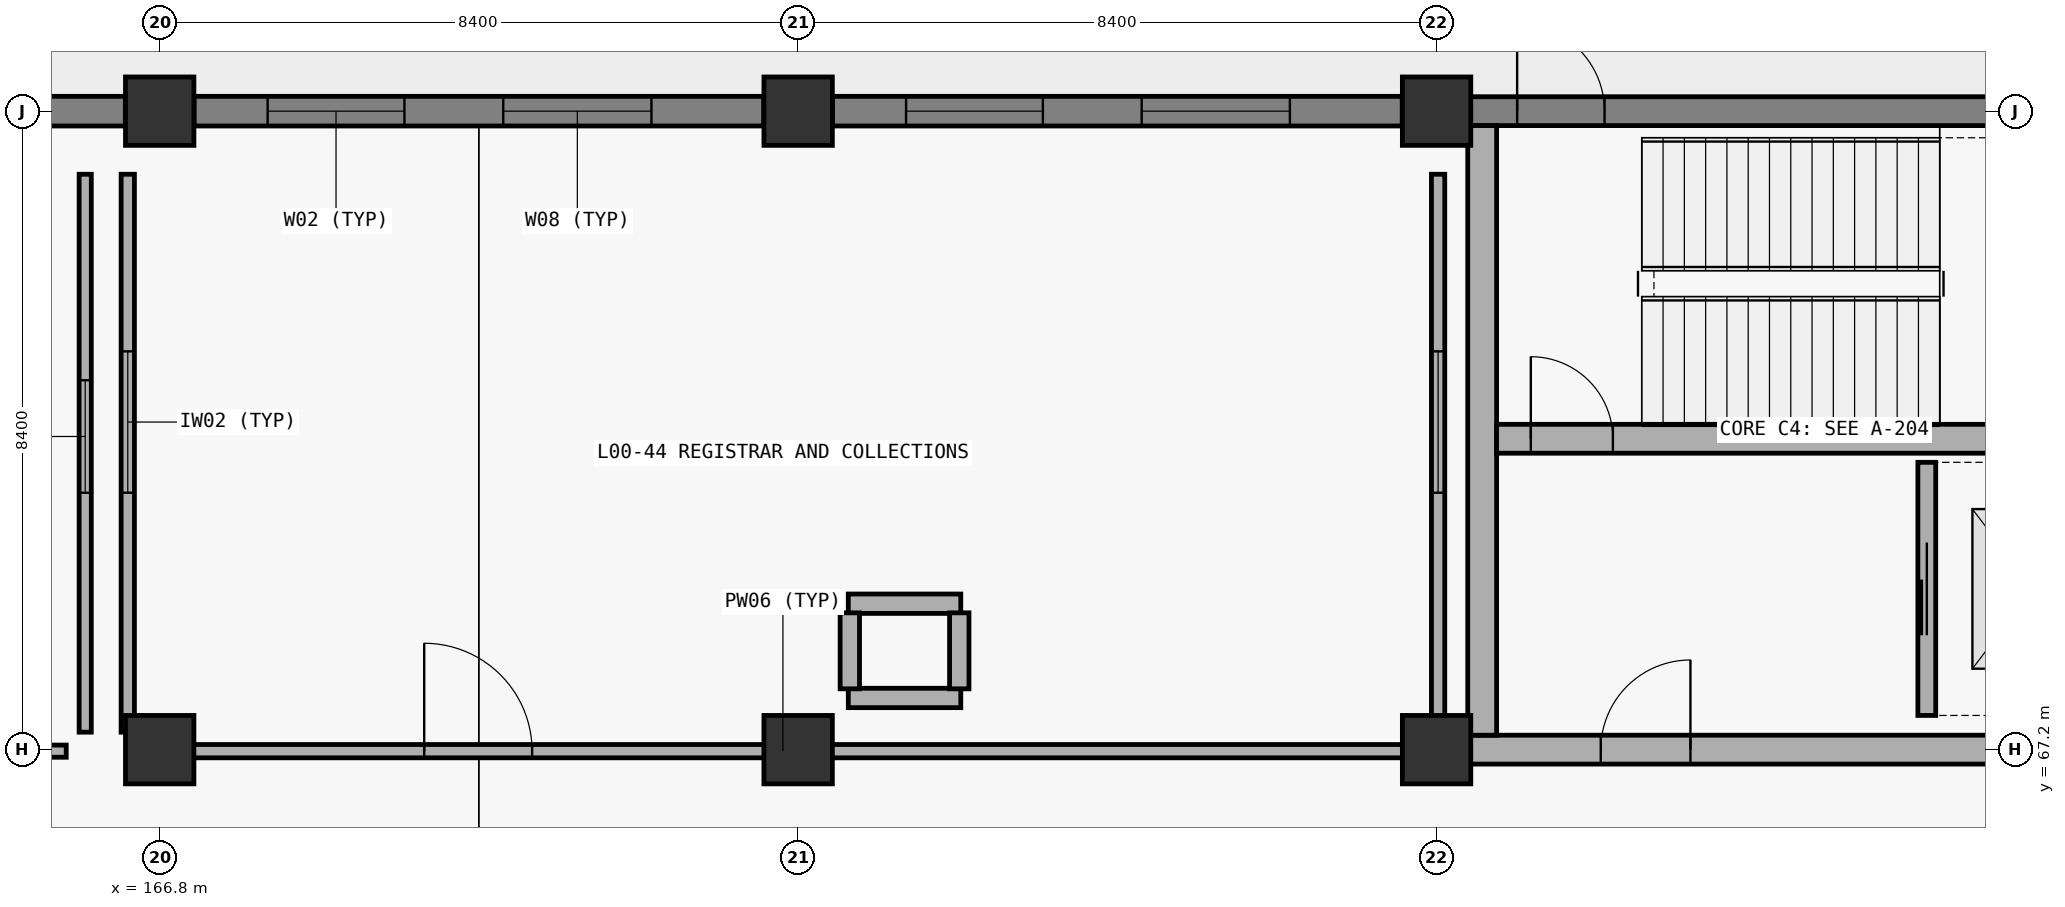
"""IFC4 building model, lengths in metres.
Left out: names, types, materials, properties, quantities, classifications, styles, units other than length and angle.
Written with IfcOpenShell. Run it as: python <this file> out.ifc"""

import sys

from ifc_helpers import new_model, si_unit, direction, frame, frame_2d, origin, origin_2d, place, context, subcontext, project, spatial, rectangle, extrude, element, fill, save


model = new_model("IFC4")
c1 = context("Model", 3, precision=1e-05, world=origin(), true_north=direction((0.0, 1.0)))
c2 = subcontext(c1, "Body", "Model", "MODEL_VIEW")
j1 = project(units=[si_unit("LENGTHUNIT", "METRE"), si_unit("PLANEANGLEUNIT", "RADIAN")], contexts=[c1])
p1 = place(None, origin())
s1 = spatial("IfcSite", under=j1, at=p1, CompositionType="ELEMENT")
p2 = place(p1, origin())
s2 = spatial("IfcBuilding", under=s1, at=p2, CompositionType="ELEMENT")
p3 = place(p2, origin())
s3 = spatial("IfcBuildingStorey", under=s2, at=p3, CompositionType="ELEMENT", Elevation=0.0)
for number, where, z_axis, x_axis in (
    (1, (166.8, 67.2, 0.0), (0.0, 0.0, 1.0), (1.0, 0.0, 0.0)),
    (2, (166.8, 75.6, 0.0), (0.0, 0.0, 1.0), (1.0, 0.0, 0.0)),
    (3, (175.2, 67.2, 0.0), (0.0, 0.0, 1.0), (1.0, 0.0, 0.0)),
    (4, (175.2, 75.6, 0.0), (0.0, 0.0, 1.0), (1.0, 0.0, 0.0)),
    (5, (183.6, 67.2, 0.0), (0.0, 0.0, 1.0), (1.0, 0.0, 0.0)),
    (6, (183.6, 75.6, 0.0), (0.0, 0.0, 1.0), (1.0, 0.0, 0.0)),
):
    element("IfcColumn", number, at=place(p3, frame(where, z_axis=z_axis, x_axis=x_axis)), inside=s3, PredefinedType="COLUMN", context=c2, shape_type="SweptSolid", body=[
        extrude(rectangle(XDim=0.9, YDim=0.9, at=origin_2d()), origin(), (0.0, 0.0, 1.0), 5.4),
    ])
p4 = place(p3, frame((184.01, 67.2, 0.0), z_axis=(0.0, 0.0, 1.0), x_axis=(1.0, 0.0, 0.0)))
e7 = element("IfcWall", 7, at=p4, inside=s3, PredefinedType="SHEAR", context=c2, shape_type="SweptSolid", body=[
    extrude(rectangle(XDim=9.38, YDim=0.38, at=frame_2d((4.69, 0.0))), origin(), (0.0, 0.0, 1.0), 5.4),
])
p5 = place(p4, frame((1.75, 0.0, 0.0)))
e8 = element("IfcOpeningElement", 8, at=p5, cuts=e7, PredefinedType="OPENING", context=c2, shape_type="SweptSolid", body=[
    extrude(rectangle(XDim=1.18, YDim=2.24, at=frame_2d((0.59, 1.12))), frame((0.0, 0.2, 0.0), z_axis=(0.0, -1.0, 0.0), x_axis=(1.0, 0.0, 0.0)), (0.0, 0.0, 1.0), 0.4),
])
p6 = place(p3, frame((184.01, 75.6, 0.0), z_axis=(0.0, 0.0, 1.0), x_axis=(1.0, 0.0, 0.0)))
e9 = element("IfcWall", 9, at=p6, inside=s3, PredefinedType="SHEAR", context=c2, shape_type="SweptSolid", body=[
    extrude(rectangle(XDim=9.38, YDim=0.38, at=frame_2d((4.69, 0.0))), origin(), (0.0, 0.0, 1.0), 5.4),
])
p7 = place(p6, frame((0.65, 0.0, 0.0)))
e10 = element("IfcOpeningElement", 10, at=p7, cuts=e9, PredefinedType="OPENING", context=c2, shape_type="SweptSolid", body=[
    extrude(rectangle(XDim=1.15, YDim=2.2, at=frame_2d((0.575, 1.1))), frame((0.0, 0.2, 0.0), z_axis=(0.0, -1.0, 0.0), x_axis=(1.0, 0.0, 0.0)), (0.0, 0.0, 1.0), 0.4),
])
p8 = place(p3, frame((184.2, 67.39, 0.0), z_axis=(0.0, 0.0, 1.0), x_axis=(0.0, 1.0, 0.0)))
e11 = element("IfcWall", 11, at=p8, inside=s3, PredefinedType="SHEAR", context=c2, shape_type="SweptSolid", body=[
    extrude(rectangle(XDim=8.02, YDim=0.38, at=frame_2d((4.01, 0.0))), origin(), (0.0, 0.0, 1.0), 5.4),
])
p9 = place(p3, frame((184.39, 71.29, 0.0), z_axis=(0.0, 0.0, 1.0), x_axis=(1.0, 0.0, 0.0)))
e12 = element("IfcWall", 12, at=p9, inside=s3, PredefinedType="SHEAR", context=c2, shape_type="SweptSolid", body=[
    extrude(rectangle(XDim=8.62, YDim=0.38, at=frame_2d((4.31, 0.0))), origin(), (0.0, 0.0, 1.0), 5.4),
])
p10 = place(p9, frame((0.45, 0.0, 0.0)))
e13 = element("IfcOpeningElement", 13, at=p10, cuts=e12, PredefinedType="OPENING", context=c2, shape_type="SweptSolid", body=[
    extrude(rectangle(XDim=1.08, YDim=2.18, at=frame_2d((0.54, 1.09))), frame((0.0, 0.2, 0.0), z_axis=(0.0, -1.0, 0.0), x_axis=(1.0, 0.0, 0.0)), (0.0, 0.0, 1.0), 0.4),
])
p11 = place(p3, frame((158.852, 75.6, 0.0), z_axis=(0.0, 0.0, 1.0), x_axis=(1.0, 0.0, 0.0)))
e14 = element("IfcWall", 14, at=p11, inside=s3, PredefinedType="SOLIDWALL", context=c2, shape_type="SweptSolid", body=[
    extrude(rectangle(XDim=7.496, YDim=0.39, at=frame_2d((3.748, 0.0))), origin(), (0.0, 0.0, 1.0), 4.44),
])
p12 = place(p11, frame((0.968, 0.0, 0.85)))
e15 = element("IfcOpeningElement", 15, at=p12, cuts=e14, PredefinedType="OPENING", context=c2, shape_type="SweptSolid", body=[
    extrude(rectangle(XDim=1.8, YDim=2.5, at=frame_2d((0.9, 1.25))), frame((0.0, 0.205, 0.0), z_axis=(0.0, -1.0, 0.0), x_axis=(1.0, 0.0, 0.0)), (0.0, 0.0, 1.0), 0.41),
])
p13 = place(p11, frame((4.068, 0.0, 0.85)))
e16 = element("IfcOpeningElement", 16, at=p13, cuts=e14, PredefinedType="OPENING", context=c2, shape_type="SweptSolid", body=[
    extrude(rectangle(XDim=1.95, YDim=2.3, at=frame_2d((0.975, 1.15))), frame((0.0, 0.205, 0.0), z_axis=(0.0, -1.0, 0.0), x_axis=(1.0, 0.0, 0.0)), (0.0, 0.0, 1.0), 0.41),
])
p14 = place(p3, frame((167.252, 75.6, 0.0), z_axis=(0.0, 0.0, 1.0), x_axis=(1.0, 0.0, 0.0)))
e17 = element("IfcWall", 17, at=p14, inside=s3, PredefinedType="SOLIDWALL", context=c2, shape_type="SweptSolid", body=[
    extrude(rectangle(XDim=7.496, YDim=0.39, at=frame_2d((3.748, 0.0))), origin(), (0.0, 0.0, 1.0), 4.69),
])
p15 = place(p14, frame((0.968, 0.0, 0.85)))
e18 = element("IfcOpeningElement", 18, at=p15, cuts=e17, PredefinedType="OPENING", context=c2, shape_type="SweptSolid", body=[
    extrude(rectangle(XDim=1.8, YDim=2.5, at=frame_2d((0.9, 1.25))), frame((0.0, 0.205, 0.0), z_axis=(0.0, -1.0, 0.0), x_axis=(1.0, 0.0, 0.0)), (0.0, 0.0, 1.0), 0.41),
])
p16 = place(p14, frame((4.068, 0.0, 0.85)))
e19 = element("IfcOpeningElement", 19, at=p16, cuts=e17, PredefinedType="OPENING", context=c2, shape_type="SweptSolid", body=[
    extrude(rectangle(XDim=1.95, YDim=2.3, at=frame_2d((0.975, 1.15))), frame((0.0, 0.205, 0.0), z_axis=(0.0, -1.0, 0.0), x_axis=(1.0, 0.0, 0.0)), (0.0, 0.0, 1.0), 0.41),
])
p17 = place(p3, frame((175.652, 75.6, 0.0), z_axis=(0.0, 0.0, 1.0), x_axis=(1.0, 0.0, 0.0)))
e20 = element("IfcWall", 20, at=p17, inside=s3, PredefinedType="SOLIDWALL", context=c2, shape_type="SweptSolid", body=[
    extrude(rectangle(XDim=7.496, YDim=0.39, at=frame_2d((3.748, 0.0))), origin(), (0.0, 0.0, 1.0), 4.44),
])
p18 = place(p17, frame((0.968, 0.0, 0.85)))
e21 = element("IfcOpeningElement", 21, at=p18, cuts=e20, PredefinedType="OPENING", context=c2, shape_type="SweptSolid", body=[
    extrude(rectangle(XDim=1.8, YDim=2.5, at=frame_2d((0.9, 1.25))), frame((0.0, 0.205, 0.0), z_axis=(0.0, -1.0, 0.0), x_axis=(1.0, 0.0, 0.0)), (0.0, 0.0, 1.0), 0.41),
])
p19 = place(p17, frame((4.068, 0.0, 0.85)))
e22 = element("IfcOpeningElement", 22, at=p19, cuts=e20, PredefinedType="OPENING", context=c2, shape_type="SweptSolid", body=[
    extrude(rectangle(XDim=1.95, YDim=2.3, at=frame_2d((0.975, 1.15))), frame((0.0, 0.205, 0.0), z_axis=(0.0, -1.0, 0.0), x_axis=(1.0, 0.0, 0.0)), (0.0, 0.0, 1.0), 0.41),
])
p20 = place(p3, frame((190.05, 67.65, 0.0), z_axis=(0.0, 0.0, 1.0), x_axis=(0.0, 1.0, 0.0)))
e23 = element("IfcWall", 23, at=p20, inside=s3, PredefinedType="PARTITIONING", context=c2, shape_type="SweptSolid", body=[
    extrude(rectangle(XDim=3.33, YDim=0.235, at=frame_2d((1.665, 0.0))), origin(), (0.0, 0.0, 1.0), 5.04),
])
p21 = place(p20, frame((1.055, 0.0, 0.0)))
e24 = element("IfcOpeningElement", 24, at=p21, cuts=e23, PredefinedType="OPENING", context=c2, shape_type="SweptSolid", body=[
    extrude(rectangle(XDim=1.22, YDim=2.24, at=frame_2d((0.61, 1.12))), frame((0.0, 0.127, 0.0), z_axis=(0.0, -1.0, 0.0), x_axis=(1.0, 0.0, 0.0)), (0.0, 0.0, 1.0), 0.255),
])
for number, where, z_axis, x_axis in (
    (25, (175.86, 69.12, 0.0), (0.0, 0.0, 1.0), (1.0, 0.0, 0.0)),
    (26, (175.86, 67.88, 0.0), (0.0, 0.0, 1.0), (1.0, 0.0, 0.0)),
):
    element("IfcWall", number, at=place(p3, frame(where, z_axis=z_axis, x_axis=x_axis)), inside=s3, PredefinedType="PARTITIONING", context=c2, shape_type="SweptSolid", body=[
        extrude(rectangle(XDim=1.48, YDim=0.255, at=frame_2d((0.74, 0.0))), origin(), (0.0, 0.0, 1.0), 5.04),
    ])
for number, where, z_axis, x_axis in (
    (27, (175.88, 68.0, 0.0), (0.0, 0.0, 1.0), (0.0, 1.0, 0.0)),
    (28, (177.32, 68.0, 0.0), (0.0, 0.0, 1.0), (0.0, 1.0, 0.0)),
):
    element("IfcWall", number, at=place(p3, frame(where, z_axis=z_axis, x_axis=x_axis)), inside=s3, PredefinedType="PARTITIONING", context=c2, shape_type="SweptSolid", body=[
        extrude(rectangle(XDim=1.0, YDim=0.255, at=frame_2d((0.5, 0.0))), origin(), (0.0, 0.0, 1.0), 5.04),
    ])
p22 = place(p3, frame((142.43, 67.18, 0.0), z_axis=(0.0, 0.0, 1.0), x_axis=(1.0, 0.0, 0.0)))
e29 = element("IfcWall", 29, at=p22, inside=s3, PredefinedType="PARTITIONING", context=c2, shape_type="SweptSolid", body=[
    extrude(rectangle(XDim=23.14, YDim=0.16, at=frame_2d((11.57, 0.0))), origin(), (0.0, 0.0, 1.0), 4.09),
])
p23 = place(p22, frame((2.65, 0.0, 0.0)))
e30 = element("IfcOpeningElement", 30, at=p23, cuts=e29, PredefinedType="OPENING", context=c2, shape_type="SweptSolid", body=[
    extrude(rectangle(XDim=1.36, YDim=2.36, at=frame_2d((0.68, 1.18))), frame((0.0, 0.09, 0.0), z_axis=(0.0, -1.0, 0.0), x_axis=(1.0, 0.0, 0.0)), (0.0, 0.0, 1.0), 0.18),
])
p24 = place(p3, frame((165.82, 67.43, 0.0), z_axis=(0.0, 0.0, 1.0), x_axis=(0.0, 1.0, 0.0)))
e31 = element("IfcWall", 31, at=p24, inside=s3, PredefinedType="PARTITIONING", context=c2, shape_type="SweptSolid", body=[
    extrude(rectangle(XDim=7.34, YDim=0.16, at=frame_2d((3.67, 0.0))), origin(), (0.0, 0.0, 1.0), 4.09),
])
p25 = place(p24, frame((3.15, 0.0, 0.9)))
e32 = element("IfcOpeningElement", 32, at=p25, cuts=e31, PredefinedType="OPENING", context=c2, shape_type="SweptSolid", body=[
    extrude(rectangle(XDim=1.48, YDim=1.35, at=frame_2d((0.74, 0.675))), frame((0.0, 0.09, 0.0), z_axis=(0.0, -1.0, 0.0), x_axis=(1.0, 0.0, 0.0)), (0.0, 0.0, 1.0), 0.18),
])
p26 = place(p3, frame((166.63, 67.18, 0.0), z_axis=(0.0, 0.0, 1.0), x_axis=(1.0, 0.0, 0.0)))
e33 = element("IfcWall", 33, at=p26, inside=s3, PredefinedType="PARTITIONING", context=c2, shape_type="SweptSolid", body=[
    extrude(rectangle(XDim=16.74, YDim=0.175, at=frame_2d((8.37, 0.0))), origin(), (0.0, 0.0, 1.0), 4.09),
])
p27 = place(p26, frame((3.65, 0.0, 0.0)))
e34 = element("IfcOpeningElement", 34, at=p27, cuts=e33, PredefinedType="OPENING", context=c2, shape_type="SweptSolid", body=[
    extrude(rectangle(XDim=1.42, YDim=2.4, at=frame_2d((0.71, 1.2))), frame((0.0, 0.097, 0.0), z_axis=(0.0, -1.0, 0.0), x_axis=(1.0, 0.0, 0.0)), (0.0, 0.0, 1.0), 0.195),
])
p28 = place(p3, frame((166.38, 67.43, 0.0), z_axis=(0.0, 0.0, 1.0), x_axis=(0.0, 1.0, 0.0)))
e35 = element("IfcWall", 35, at=p28, inside=s3, PredefinedType="PARTITIONING", context=c2, shape_type="SweptSolid", body=[
    extrude(rectangle(XDim=7.34, YDim=0.175, at=frame_2d((3.67, 0.0))), origin(), (0.0, 0.0, 1.0), 4.09),
])
p29 = place(p28, frame((3.15, 0.0, 0.9)))
e36 = element("IfcOpeningElement", 36, at=p29, cuts=e35, PredefinedType="OPENING", context=c2, shape_type="SweptSolid", body=[
    extrude(rectangle(XDim=1.86, YDim=1.28, at=frame_2d((0.93, 0.64))), frame((0.0, 0.097, 0.0), z_axis=(0.0, -1.0, 0.0), x_axis=(1.0, 0.0, 0.0)), (0.0, 0.0, 1.0), 0.195),
])
p30 = place(p3, frame((183.62, 67.43, 0.0), z_axis=(0.0, 0.0, 1.0), x_axis=(0.0, 1.0, 0.0)))
e37 = element("IfcWall", 37, at=p30, inside=s3, PredefinedType="PARTITIONING", context=c2, shape_type="SweptSolid", body=[
    extrude(rectangle(XDim=7.34, YDim=0.175, at=frame_2d((3.67, 0.0))), origin(), (0.0, 0.0, 1.0), 4.09),
])
p31 = place(p30, frame((3.15, 0.0, 0.9)))
e38 = element("IfcOpeningElement", 38, at=p31, cuts=e37, PredefinedType="OPENING", context=c2, shape_type="SweptSolid", body=[
    extrude(rectangle(XDim=1.86, YDim=1.28, at=frame_2d((0.93, 0.64))), frame((0.0, 0.097, 0.0), z_axis=(0.0, -1.0, 0.0), x_axis=(1.0, 0.0, 0.0)), (0.0, 0.0, 1.0), 0.195),
])
p32 = place(p15, origin())
e39 = element("IfcWindow", 39, at=p32, inside=s3, PartitioningType="SINGLE_PANEL", PredefinedType="WINDOW", context=c2, shape_type="SweptSolid", body=[
    extrude(rectangle(XDim=1.8, YDim=2.5, at=frame_2d((0.9, 1.25))), frame((0.0, 0.03, 0.0), z_axis=(0.0, -1.0, 0.0), x_axis=(1.0, 0.0, 0.0)), (0.0, 0.0, 1.0), 0.06),
])
fill(e18, e39)
p33 = place(p16, origin())
e40 = element("IfcWindow", 40, at=p33, inside=s3, PartitioningType="SINGLE_PANEL", PredefinedType="WINDOW", context=c2, shape_type="SweptSolid", body=[
    extrude(rectangle(XDim=1.95, YDim=2.3, at=frame_2d((0.975, 1.15))), frame((0.0, 0.03, 0.0), z_axis=(0.0, -1.0, 0.0), x_axis=(1.0, 0.0, 0.0)), (0.0, 0.0, 1.0), 0.06),
])
fill(e19, e40)
p34 = place(p18, origin())
e41 = element("IfcWindow", 41, at=p34, inside=s3, PartitioningType="SINGLE_PANEL", PredefinedType="WINDOW", context=c2, shape_type="SweptSolid", body=[
    extrude(rectangle(XDim=1.8, YDim=2.5, at=frame_2d((0.9, 1.25))), frame((0.0, 0.03, 0.0), z_axis=(0.0, -1.0, 0.0), x_axis=(1.0, 0.0, 0.0)), (0.0, 0.0, 1.0), 0.06),
])
fill(e21, e41)
p35 = place(p19, origin())
e42 = element("IfcWindow", 42, at=p35, inside=s3, PartitioningType="SINGLE_PANEL", PredefinedType="WINDOW", context=c2, shape_type="SweptSolid", body=[
    extrude(rectangle(XDim=1.95, YDim=2.3, at=frame_2d((0.975, 1.15))), frame((0.0, 0.03, 0.0), z_axis=(0.0, -1.0, 0.0), x_axis=(1.0, 0.0, 0.0)), (0.0, 0.0, 1.0), 0.06),
])
fill(e22, e42)
p36 = place(p7, origin())
e43 = element("IfcDoor", 43, at=p36, inside=s3, OperationType="SINGLE_SWING_LEFT", PredefinedType="DOOR", context=c2, shape_type="SweptSolid", body=[
    extrude(rectangle(XDim=1.15, YDim=2.2, at=frame_2d((0.575, 1.1))), frame((0.0, 0.025, 0.0), z_axis=(0.0, -1.0, 0.0), x_axis=(1.0, 0.0, 0.0)), (0.0, 0.0, 1.0), 0.05),
])
fill(e10, e43)
p37 = place(p10, origin())
e44 = element("IfcDoor", 44, at=p37, inside=s3, OperationType="SINGLE_SWING_LEFT", PredefinedType="DOOR", context=c2, shape_type="SweptSolid", body=[
    extrude(rectangle(XDim=1.08, YDim=2.18, at=frame_2d((0.54, 1.09))), frame((0.0, 0.025, 0.0), z_axis=(0.0, -1.0, 0.0), x_axis=(1.0, 0.0, 0.0)), (0.0, 0.0, 1.0), 0.05),
])
fill(e13, e44)
p38 = place(p5, origin())
e45 = element("IfcDoor", 45, at=p38, inside=s3, OperationType="SINGLE_SWING_RIGHT", PredefinedType="DOOR", context=c2, shape_type="SweptSolid", body=[
    extrude(rectangle(XDim=1.18, YDim=2.24, at=frame_2d((0.59, 1.12))), frame((0.0, 0.025, 0.0), z_axis=(0.0, -1.0, 0.0), x_axis=(1.0, 0.0, 0.0)), (0.0, 0.0, 1.0), 0.05),
])
fill(e8, e45)
p39 = place(p21, origin())
e46 = element("IfcDoor", 46, at=p39, inside=s3, OperationType="SLIDING_TO_RIGHT", PredefinedType="DOOR", context=c2, shape_type="SweptSolid", body=[
    extrude(rectangle(XDim=1.22, YDim=2.24, at=frame_2d((0.61, 1.12))), frame((0.0, 0.025, 0.0), z_axis=(0.0, -1.0, 0.0), x_axis=(1.0, 0.0, 0.0)), (0.0, 0.0, 1.0), 0.05),
])
fill(e24, e46)
p40 = place(p25, origin())
e47 = element("IfcWindow", 47, at=p40, inside=s3, PartitioningType="SINGLE_PANEL", PredefinedType="WINDOW", context=c2, shape_type="SweptSolid", body=[
    extrude(rectangle(XDim=1.48, YDim=1.35, at=frame_2d((0.74, 0.675))), frame((0.0, 0.03, 0.0), z_axis=(0.0, -1.0, 0.0), x_axis=(1.0, 0.0, 0.0)), (0.0, 0.0, 1.0), 0.06),
])
fill(e32, e47)
p41 = place(p27, origin())
e48 = element("IfcDoor", 48, at=p41, inside=s3, OperationType="SINGLE_SWING_LEFT", PredefinedType="DOOR", context=c2, shape_type="SweptSolid", body=[
    extrude(rectangle(XDim=1.42, YDim=2.4, at=frame_2d((0.71, 1.2))), frame((0.0, 0.025, 0.0), z_axis=(0.0, -1.0, 0.0), x_axis=(1.0, 0.0, 0.0)), (0.0, 0.0, 1.0), 0.05),
])
fill(e34, e48)
p42 = place(p29, origin())
e49 = element("IfcWindow", 49, at=p42, inside=s3, PartitioningType="SINGLE_PANEL", PredefinedType="WINDOW", context=c2, shape_type="SweptSolid", body=[
    extrude(rectangle(XDim=1.86, YDim=1.28, at=frame_2d((0.93, 0.64))), frame((0.0, 0.03, 0.0), z_axis=(0.0, -1.0, 0.0), x_axis=(1.0, 0.0, 0.0)), (0.0, 0.0, 1.0), 0.06),
])
fill(e36, e49)
p43 = place(p31, origin())
e50 = element("IfcWindow", 50, at=p43, inside=s3, PartitioningType="SINGLE_PANEL", PredefinedType="WINDOW", context=c2, shape_type="SweptSolid", body=[
    extrude(rectangle(XDim=1.86, YDim=1.28, at=frame_2d((0.93, 0.64))), frame((0.0, 0.03, 0.0), z_axis=(0.0, -1.0, 0.0), x_axis=(1.0, 0.0, 0.0)), (0.0, 0.0, 1.0), 0.06),
])
fill(e38, e50)
save(model, sys.argv[1])
